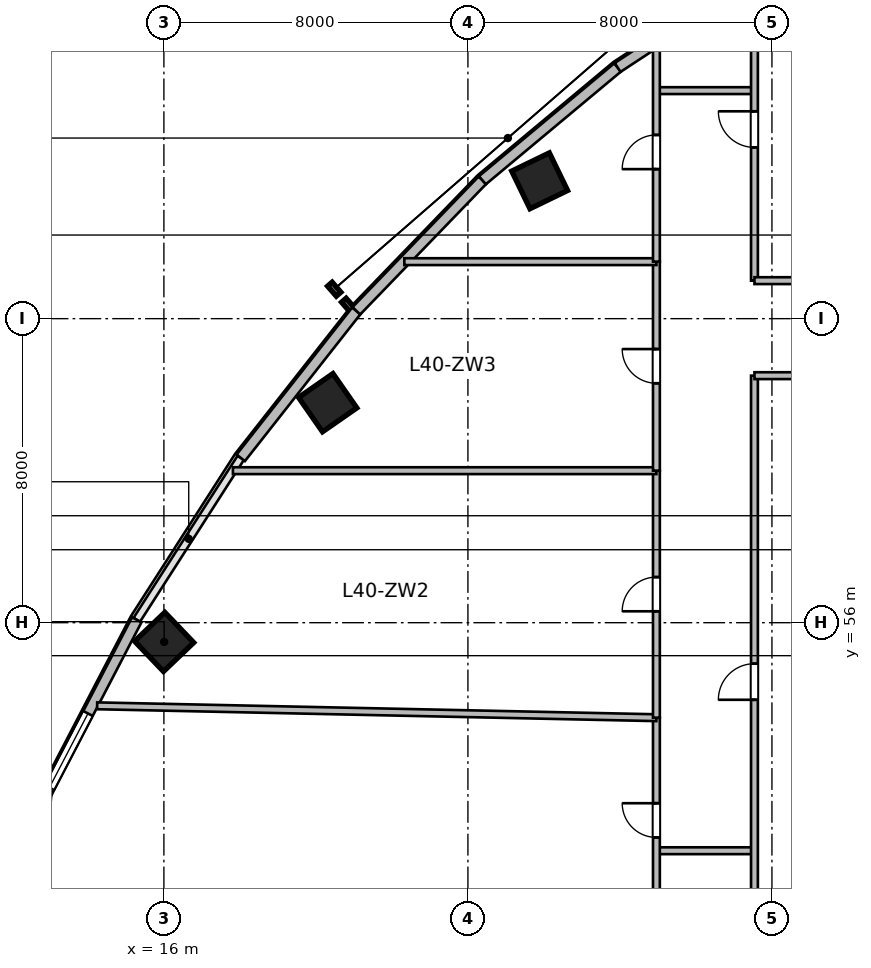
"""IFC4 building model, lengths in metres.
Left out: names, types, materials, properties, quantities, classifications, styles, units other than length and angle.
Written with IfcOpenShell. Run it as: python <this file> out.ifc"""

import sys

from ifc_helpers import new_model, si_unit, direction, frame, frame_2d, origin, origin_2d, place, context, subcontext, project, spatial, rectangle, extrude, source, transform, mapped, element, fill, save


model = new_model("IFC4")
c1 = context("Model", 3, precision=1e-05, world=origin(), true_north=direction((0.0, 1.0)))
c2 = subcontext(c1, "Body", "Model", "MODEL_VIEW")
j1 = project(units=[si_unit("LENGTHUNIT", "METRE"), si_unit("PLANEANGLEUNIT", "RADIAN")], contexts=[c1])
p1 = place(None, origin())
s1 = spatial("IfcSite", under=j1, at=p1, CompositionType="ELEMENT")
p2 = place(p1, origin())
s2 = spatial("IfcBuilding", under=s1, at=p2, CompositionType="ELEMENT")
p3 = place(p2, frame((0.0, 0.0, 166.2)))
s3 = spatial("IfcBuildingStorey", under=s2, at=p3, CompositionType="ELEMENT", Elevation=166.2)
m1 = source(origin(), c2, "Body", "SweptSolid", [
    extrude(rectangle(XDim=1.1, YDim=1.1, at=origin_2d()), origin(), (0.0, 0.0, 1.0), 3.9),
])
for number, where, z_axis, x_axis in (
    (1, (16.007, 55.494, 0.0), (0.0, 0.0, 1.0), (-0.691, 0.723, 0.0)),
    (2, (20.311, 61.789, 0.0), (0.0, 0.0, 1.0), (-0.571, 0.821, 0.0)),
    (3, (25.888, 67.627, 0.0), (0.0, 0.0, 1.0), (-0.436, 0.9, 0.0)),
):
    element("IfcColumn", number, at=place(p3, frame(where, z_axis=z_axis, x_axis=x_axis)), inside=s3, PredefinedType="COLUMN", context=c2, shape_type="MappedRepresentation", body=[
        mapped(m1, transform((0.0, 0.0, 0.0), scale=1.0)),
    ])
m2 = source(origin(), c2, "Body", "SweptSolid", [
    extrude(rectangle(XDim=2.812, YDim=0.28, at=frame_2d((1.406, 0.0))), origin(), (0.0, 0.0, 1.0), 3.65),
])
p4 = place(p3, frame((33.945, 48.973, 0.0), z_axis=(0.0, 0.0, 1.0), x_axis=(-0.694583668785, -0.719411931411, 0.0)))
e4 = element("IfcWall", 4, at=p4, inside=s3, PredefinedType="SOLIDWALL", context=c2, shape_type="MappedRepresentation", body=[
    mapped(m2, transform((0.0, 0.0, 0.0), scale=1.0)),
])
m3 = source(origin(), c2, "Body", "SweptSolid", [
    extrude(rectangle(XDim=5.171, YDim=0.28, at=frame_2d((2.585, 0.0))), origin(), (0.0, 0.0, 1.0), 3.65),
])
p5 = place(p3, frame((12.898, 51.489, 0.0), z_axis=(0.0, 0.0, 1.0), x_axis=(0.461752581363, 0.887008767491, 0.0)))
e5 = element("IfcWall", 5, at=p5, inside=s3, PredefinedType="SOLIDWALL", context=c2, shape_type="MappedRepresentation", body=[
    mapped(m3, transform((0.0, 0.0, 0.0), scale=1.0)),
])
p6 = place(p5, frame((0.193, 0.0, 0.95)))
e6 = element("IfcOpeningElement", 6, at=p6, cuts=e5, PredefinedType="OPENING", context=c2, shape_type="SweptSolid", body=[
    extrude(rectangle(XDim=2.2, YDim=2.1, at=frame_2d((1.1, 1.05))), frame((0.0, 0.15, 0.0), z_axis=(0.0, -1.0, 0.0), x_axis=(1.0, 0.0, 0.0)), (0.0, 0.0, 1.0), 0.3),
])
m4 = source(origin(), c2, "Body", "SweptSolid", [
    extrude(rectangle(XDim=4.922, YDim=0.28, at=frame_2d((2.461, 0.0))), origin(), (0.0, 0.0, 1.0), 3.65),
])
p7 = place(p3, frame((18.021, 60.338, 0.0), z_axis=(0.0, 0.0, 1.0), x_axis=(0.61817639101, 0.786039407153, 0.0)))
e7 = element("IfcWall", 7, at=p7, inside=s3, PredefinedType="SOLIDWALL", context=c2, shape_type="MappedRepresentation", body=[
    mapped(m4, transform((0.0, 0.0, 0.0), scale=1.0)),
])
m5 = source(origin(), c2, "Body", "SweptSolid", [
    extrude(rectangle(XDim=4.776, YDim=0.28, at=frame_2d((2.388, 0.0))), origin(), (0.0, 0.0, 1.0), 3.65),
])
p8 = place(p3, frame((21.064, 64.206, 0.0), z_axis=(0.0, 0.0, 1.0), x_axis=(0.694601811851, 0.719394414055, 0.0)))
e8 = element("IfcWall", 8, at=p8, inside=s3, PredefinedType="SOLIDWALL", context=c2, shape_type="MappedRepresentation", body=[
    mapped(m5, transform((0.0, 0.0, 0.0), scale=1.0)),
])
m6 = source(origin(), c2, "Body", "SweptSolid", [
    extrude(rectangle(XDim=4.634, YDim=0.28, at=frame_2d((2.317, 0.0))), origin(), (0.0, 0.0, 1.0), 3.65),
])
p9 = place(p3, frame((24.381, 67.642, 0.0), z_axis=(0.0, 0.0, 1.0), x_axis=(0.767910229096, 0.640557475993, 0.0)))
e9 = element("IfcWall", 9, at=p9, inside=s3, PredefinedType="SOLIDWALL", context=c2, shape_type="MappedRepresentation", body=[
    mapped(m6, transform((0.0, 0.0, 0.0), scale=1.0)),
])
m7 = source(origin(), c2, "Body", "SweptSolid", [
    extrude(rectangle(XDim=4.501, YDim=0.28, at=frame_2d((2.25, 0.0))), origin(), (0.0, 0.0, 1.0), 3.65),
])
p10 = place(p3, frame((27.939, 70.61, 0.0), z_axis=(0.0, 0.0, 1.0), x_axis=(0.835984920737, 0.548752414391, 0.0)))
e10 = element("IfcWall", 10, at=p10, inside=s3, PredefinedType="SOLIDWALL", context=c2, shape_type="MappedRepresentation", body=[
    mapped(m7, transform((0.0, 0.0, 0.0), scale=1.0)),
])
m8 = source(origin(), c2, "Body", "SweptSolid", [
    extrude(rectangle(XDim=2.5, YDim=0.18, at=frame_2d((1.25, 0.0))), origin(), (0.0, 0.0, 1.0), 3.65),
])
p11 = place(p3, frame((29.0, 50.0, 0.0), z_axis=(0.0, 0.0, 1.0), x_axis=(1.0, 0.0, 0.0)))
e11 = element("IfcWall", 11, at=p11, inside=s3, PredefinedType="PLUMBINGWALL", context=c2, shape_type="MappedRepresentation", body=[
    mapped(m8, transform((0.0, 0.0, 0.0), scale=1.0)),
])
m9 = source(origin(), c2, "Body", "SweptSolid", [
    extrude(rectangle(XDim=2.5, YDim=0.18, at=frame_2d((1.25, 0.0))), origin(), (0.0, 0.0, 1.0), 3.022),
])
p12 = place(p3, frame((29.0, 70.0, 0.0), z_axis=(0.0, 0.0, 1.0), x_axis=(1.0, 0.0, 0.0)))
e12 = element("IfcWall", 12, at=p12, inside=s3, PredefinedType="PLUMBINGWALL", context=c2, shape_type="MappedRepresentation", body=[
    mapped(m9, transform((0.0, 0.0, 0.0), scale=1.0)),
])
m10 = source(origin(), c2, "Body", "SweptSolid", [
    extrude(rectangle(XDim=10.735, YDim=0.18, at=frame_2d((5.368, 0.0))), origin(), (0.0, 0.0, 1.0), 2.942),
])
p13 = place(p3, frame((28.96, 42.765, 0.0), z_axis=(0.0, 0.0, 1.0), x_axis=(0.0, 1.0, 0.0)))
e13 = element("IfcWall", 13, at=p13, inside=s3, PredefinedType="PLUMBINGWALL", context=c2, shape_type="MappedRepresentation", body=[
    mapped(m10, transform((0.0, 0.0, 0.0), scale=1.0)),
])
p14 = place(p13, frame((7.585, 0.0, 0.0)))
e14 = element("IfcOpeningElement", 14, at=p14, cuts=e13, PredefinedType="OPENING", context=c2, shape_type="SweptSolid", body=[
    extrude(rectangle(XDim=0.9, YDim=2.08, at=frame_2d((0.45, 1.04))), frame((0.0, 0.1, 0.0), z_axis=(0.0, -1.0, 0.0), x_axis=(1.0, 0.0, 0.0)), (0.0, 0.0, 1.0), 0.2),
])
m11 = source(origin(), c2, "Body", "SweptSolid", [
    extrude(rectangle(XDim=14.72, YDim=0.18, at=frame_2d((7.36, 0.0))), origin(), (0.0, 0.0, 1.0), 3.65),
])
p15 = place(p3, frame((14.243, 53.813, 0.0), z_axis=(0.0, 0.0, 1.0), x_axis=(0.999773932637, -0.021262258118, 0.0)))
e15 = element("IfcWall", 15, at=p15, inside=s3, PredefinedType="PLUMBINGWALL", context=c2, shape_type="MappedRepresentation", body=[
    mapped(m11, transform((0.0, 0.0, 0.0), scale=1.0)),
])
m12 = source(origin(), c2, "Body", "SweptSolid", [
    extrude(rectangle(XDim=6.5, YDim=0.18, at=frame_2d((3.25, 0.0))), origin(), (0.0, 0.0, 1.0), 3.081),
])
p16 = place(p3, frame((28.96, 53.5, 0.0), z_axis=(0.0, 0.0, 1.0), x_axis=(0.0, 1.0, 0.0)))
e16 = element("IfcWall", 16, at=p16, inside=s3, PredefinedType="PLUMBINGWALL", context=c2, shape_type="MappedRepresentation", body=[
    mapped(m12, transform((0.0, 0.0, 0.0), scale=1.0)),
])
p17 = place(p16, frame((2.8, 0.0, 0.0)))
e17 = element("IfcOpeningElement", 17, at=p17, cuts=e16, PredefinedType="OPENING", context=c2, shape_type="SweptSolid", body=[
    extrude(rectangle(XDim=0.9, YDim=2.08, at=frame_2d((0.45, 1.04))), frame((0.0, 0.1, 0.0), z_axis=(0.0, -1.0, 0.0), x_axis=(1.0, 0.0, 0.0)), (0.0, 0.0, 1.0), 0.2),
])
m13 = source(origin(), c2, "Body", "SweptSolid", [
    extrude(rectangle(XDim=11.144, YDim=0.18, at=frame_2d((5.572, 0.0))), origin(), (0.0, 0.0, 1.0), 3.65),
])
p18 = place(p3, frame((17.816, 60.0, 0.0), z_axis=(0.0, 0.0, 1.0), x_axis=(1.0, 0.0, 0.0)))
e18 = element("IfcWall", 18, at=p18, inside=s3, PredefinedType="PLUMBINGWALL", context=c2, shape_type="MappedRepresentation", body=[
    mapped(m13, transform((0.0, 0.0, 0.0), scale=1.0)),
])
m14 = source(origin(), c2, "Body", "SweptSolid", [
    extrude(rectangle(XDim=5.5, YDim=0.18, at=frame_2d((2.75, 0.0))), origin(), (0.0, 0.0, 1.0), 2.942),
])
p19 = place(p3, frame((28.96, 60.0, 0.0), z_axis=(0.0, 0.0, 1.0), x_axis=(0.0, 1.0, 0.0)))
e19 = element("IfcWall", 19, at=p19, inside=s3, PredefinedType="PLUMBINGWALL", context=c2, shape_type="MappedRepresentation", body=[
    mapped(m14, transform((0.0, 0.0, 0.0), scale=1.0)),
])
p20 = place(p19, frame((2.3, 0.0, 0.0)))
e20 = element("IfcOpeningElement", 20, at=p20, cuts=e19, PredefinedType="OPENING", context=c2, shape_type="SweptSolid", body=[
    extrude(rectangle(XDim=0.9, YDim=2.08, at=frame_2d((0.45, 1.04))), frame((0.0, 0.1, 0.0), z_axis=(0.0, -1.0, 0.0), x_axis=(1.0, 0.0, 0.0)), (0.0, 0.0, 1.0), 0.2),
])
m15 = source(origin(), c2, "Body", "SweptSolid", [
    extrude(rectangle(XDim=6.633, YDim=0.18, at=frame_2d((3.317, 0.0))), origin(), (0.0, 0.0, 1.0), 3.65),
])
p21 = place(p3, frame((22.327, 65.5, 0.0), z_axis=(0.0, 0.0, 1.0), x_axis=(1.0, 0.0, 0.0)))
e21 = element("IfcWall", 21, at=p21, inside=s3, PredefinedType="PLUMBINGWALL", context=c2, shape_type="MappedRepresentation", body=[
    mapped(m15, transform((0.0, 0.0, 0.0), scale=1.0)),
])
m16 = source(origin(), c2, "Body", "SweptSolid", [
    extrude(rectangle(XDim=5.768, YDim=0.18, at=frame_2d((2.884, 0.0))), origin(), (0.0, 0.0, 1.0), 3.65),
])
p22 = place(p3, frame((28.96, 65.5, 0.0), z_axis=(0.0, 0.0, 1.0), x_axis=(0.0, 1.0, 0.0)))
e22 = element("IfcWall", 22, at=p22, inside=s3, PredefinedType="PLUMBINGWALL", context=c2, shape_type="MappedRepresentation", body=[
    mapped(m16, transform((0.0, 0.0, 0.0), scale=1.0)),
])
p23 = place(p22, frame((2.434, 0.0, 0.0)))
e23 = element("IfcOpeningElement", 23, at=p23, cuts=e22, PredefinedType="OPENING", context=c2, shape_type="SweptSolid", body=[
    extrude(rectangle(XDim=0.9, YDim=2.08, at=frame_2d((0.45, 1.04))), frame((0.0, 0.1, 0.0), z_axis=(0.0, -1.0, 0.0), x_axis=(1.0, 0.0, 0.0)), (0.0, 0.0, 1.0), 0.2),
])
m17 = source(origin(), c2, "Body", "SweptSolid", [
    extrude(rectangle(XDim=16.106, YDim=0.18, at=frame_2d((8.053, 0.0))), origin(), (0.0, 0.0, 1.0), 2.942),
])
p24 = place(p3, frame((31.54, 46.394, 0.0), z_axis=(0.0, 0.0, 1.0), x_axis=(0.0, 1.0, 0.0)))
e24 = element("IfcWall", 24, at=p24, inside=s3, PredefinedType="PLUMBINGWALL", context=c2, shape_type="MappedRepresentation", body=[
    mapped(m17, transform((0.0, 0.0, 0.0), scale=1.0)),
])
p25 = place(p24, frame((7.578, 0.0, 0.0)))
e25 = element("IfcOpeningElement", 25, at=p25, cuts=e24, PredefinedType="OPENING", context=c2, shape_type="SweptSolid", body=[
    extrude(rectangle(XDim=0.95, YDim=2.1, at=frame_2d((0.475, 1.05))), frame((0.0, 0.1, 0.0), z_axis=(0.0, -1.0, 0.0), x_axis=(1.0, 0.0, 0.0)), (0.0, 0.0, 1.0), 0.2),
])
m18 = source(origin(), c2, "Body", "SweptSolid", [
    extrude(rectangle(XDim=2.86, YDim=0.18, at=frame_2d((1.43, 0.0))), origin(), (0.0, 0.0, 1.0), 3.65),
])
p26 = place(p3, frame((31.54, 62.5, 0.0), z_axis=(0.0, 0.0, 1.0), x_axis=(1.0, 0.0, 0.0)))
e26 = element("IfcWall", 26, at=p26, inside=s3, PredefinedType="PLUMBINGWALL", context=c2, shape_type="MappedRepresentation", body=[
    mapped(m18, transform((0.0, 0.0, 0.0), scale=1.0)),
])
m19 = source(origin(), c2, "Body", "SweptSolid", [
    extrude(rectangle(XDim=7.962, YDim=0.18, at=frame_2d((3.981, 0.0))), origin(), (0.0, 0.0, 1.0), 3.65),
])
p27 = place(p3, frame((31.54, 65.0, 0.0), z_axis=(0.0, 0.0, 1.0), x_axis=(0.0, 1.0, 0.0)))
e27 = element("IfcWall", 27, at=p27, inside=s3, PredefinedType="PLUMBINGWALL", context=c2, shape_type="MappedRepresentation", body=[
    mapped(m19, transform((0.0, 0.0, 0.0), scale=1.0)),
])
p28 = place(p27, frame((3.506, 0.0, 0.0)))
e28 = element("IfcOpeningElement", 28, at=p28, cuts=e27, PredefinedType="OPENING", context=c2, shape_type="SweptSolid", body=[
    extrude(rectangle(XDim=0.95, YDim=2.1, at=frame_2d((0.475, 1.05))), frame((0.0, 0.1, 0.0), z_axis=(0.0, -1.0, 0.0), x_axis=(1.0, 0.0, 0.0)), (0.0, 0.0, 1.0), 0.2),
])
p29 = place(p3, frame((31.54, 65.0, 0.0), z_axis=(0.0, 0.0, 1.0), x_axis=(1.0, 0.0, 0.0)))
e29 = element("IfcWall", 29, at=p29, inside=s3, PredefinedType="PLUMBINGWALL", context=c2, shape_type="MappedRepresentation", body=[
    mapped(m18, transform((0.0, 0.0, 0.0), scale=1.0)),
])
m20 = source(origin(), c2, "Body", "SweptSolid", [
    extrude(rectangle(XDim=2.2, YDim=2.1, at=frame_2d((1.1, 1.05))), frame((0.0, 0.03, 0.0), z_axis=(0.0, -1.0, 0.0), x_axis=(1.0, 0.0, 0.0)), (0.0, 0.0, 1.0), 0.06),
])
p30 = place(p6, origin())
e30 = element("IfcWindow", 30, at=p30, inside=s3, PartitioningType="TRIPLE_PANEL_VERTICAL", PredefinedType="WINDOW", context=c2, shape_type="MappedRepresentation", body=[
    mapped(m20, transform((0.0, 0.0, 0.0), scale=1.0)),
])
fill(e6, e30)
m21 = source(origin(), c2, "Body", "SweptSolid", [
    extrude(rectangle(XDim=0.9, YDim=2.08, at=frame_2d((0.45, 1.04))), frame((0.0, 0.025, 0.0), z_axis=(0.0, -1.0, 0.0), x_axis=(1.0, 0.0, 0.0)), (0.0, 0.0, 1.0), 0.05),
])
p31 = place(p14, origin())
e31 = element("IfcDoor", 31, at=p31, inside=s3, OperationType="SINGLE_SWING_RIGHT", PredefinedType="DOOR", context=c2, shape_type="MappedRepresentation", body=[
    mapped(m21, transform((0.0, 0.0, 0.0), scale=1.0)),
])
fill(e14, e31)
p32 = place(p17, origin())
e32 = element("IfcDoor", 32, at=p32, inside=s3, OperationType="SINGLE_SWING_LEFT", PredefinedType="DOOR", context=c2, shape_type="MappedRepresentation", body=[
    mapped(m21, transform((0.0, 0.0, 0.0), scale=1.0)),
])
fill(e17, e32)
p33 = place(p20, origin())
e33 = element("IfcDoor", 33, at=p33, inside=s3, OperationType="SINGLE_SWING_RIGHT", PredefinedType="DOOR", context=c2, shape_type="MappedRepresentation", body=[
    mapped(m21, transform((0.0, 0.0, 0.0), scale=1.0)),
])
fill(e20, e33)
p34 = place(p23, origin())
e34 = element("IfcDoor", 34, at=p34, inside=s3, OperationType="SINGLE_SWING_LEFT", PredefinedType="DOOR", context=c2, shape_type="MappedRepresentation", body=[
    mapped(m21, transform((0.0, 0.0, 0.0), scale=1.0)),
])
fill(e23, e34)
m22 = source(origin(), c2, "Body", "SweptSolid", [
    extrude(rectangle(XDim=0.95, YDim=2.1, at=frame_2d((0.475, 1.05))), frame((0.0, 0.025, 0.0), z_axis=(0.0, -1.0, 0.0), x_axis=(1.0, 0.0, 0.0)), (0.0, 0.0, 1.0), 0.05),
])
p35 = place(p25, origin())
e35 = element("IfcDoor", 35, at=p35, inside=s3, OperationType="SINGLE_SWING_LEFT", PredefinedType="DOOR", context=c2, shape_type="MappedRepresentation", body=[
    mapped(m22, transform((0.0, 0.0, 0.0), scale=1.0)),
])
fill(e25, e35)
p36 = place(p28, origin())
e36 = element("IfcDoor", 36, at=p36, inside=s3, OperationType="SINGLE_SWING_RIGHT", PredefinedType="DOOR", context=c2, shape_type="MappedRepresentation", body=[
    mapped(m22, transform((0.0, 0.0, 0.0), scale=1.0)),
])
fill(e28, e36)
save(model, sys.argv[1])
